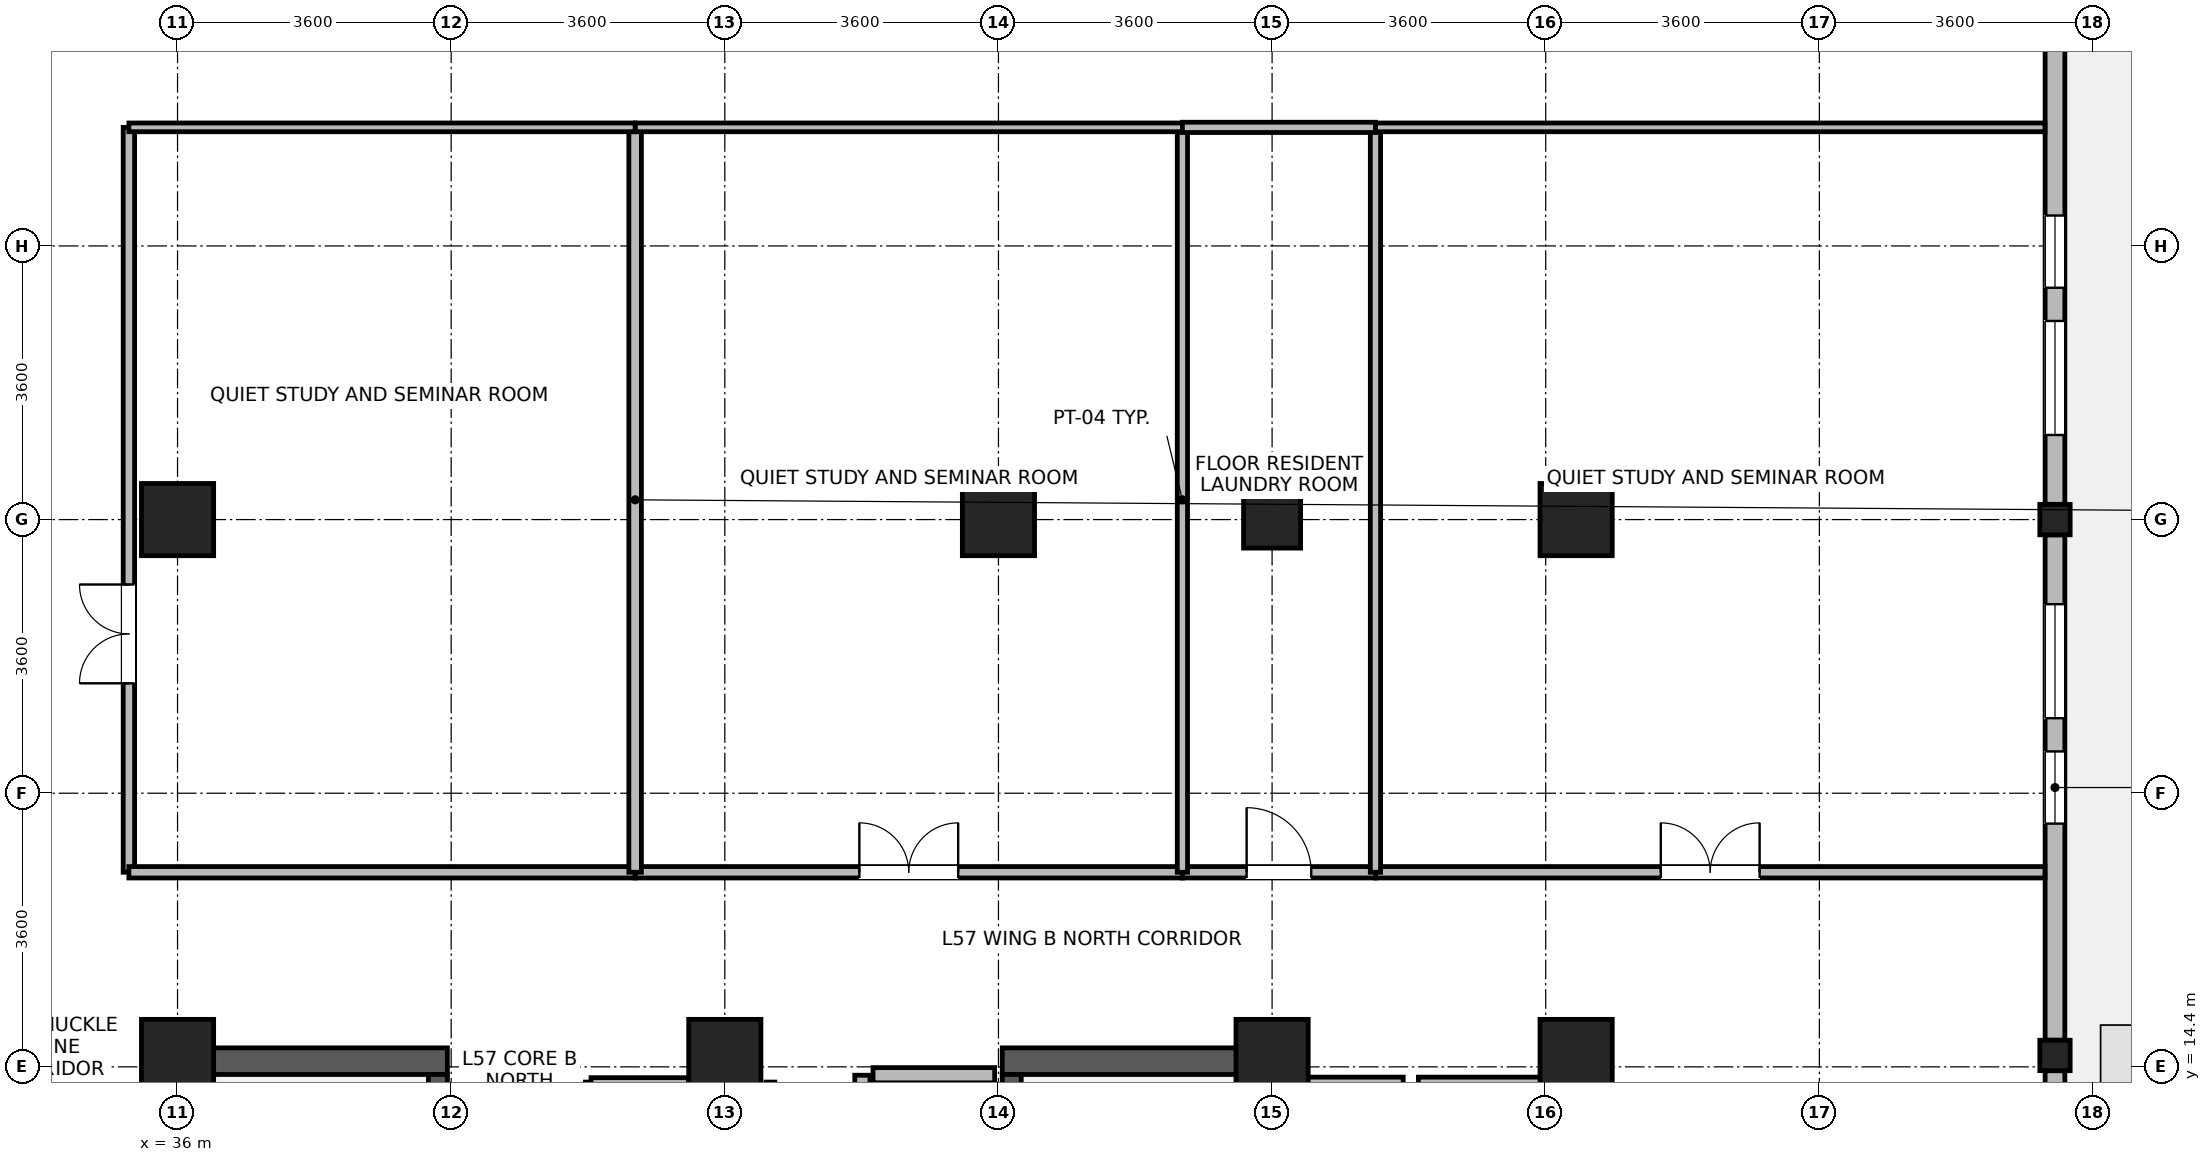
"""IFC4 building model, lengths in metres.
Left out: names, types, materials, properties, quantities, classifications, styles, units other than length and angle.
Written with IfcOpenShell. Run it as: python <this file> out.ifc"""

import sys

from ifc_helpers import new_model, si_unit, direction, frame, frame_2d, origin, origin_2d, place, context, subcontext, project, spatial, rectangle, i_section, extrude, source, transform, mapped, element, fill, save


model = new_model("IFC4")
c1 = context("Model", 3, precision=1e-05, world=origin(), true_north=direction((0.0, 1.0)))
c2 = subcontext(c1, "Body", "Model", "MODEL_VIEW")
j1 = project(units=[si_unit("LENGTHUNIT", "METRE"), si_unit("PLANEANGLEUNIT", "RADIAN")], contexts=[c1])
p1 = place(None, origin())
s1 = spatial("IfcSite", under=j1, at=p1, CompositionType="ELEMENT")
p2 = place(p1, origin())
s2 = spatial("IfcBuilding", under=s1, at=p2, CompositionType="ELEMENT")
p3 = place(p2, frame((0.0, 0.0, 224.0)))
s3 = spatial("IfcBuildingStorey", under=s2, at=p3, CompositionType="ELEMENT", Elevation=224.0)
for number, where, z_axis, x_axis in (
    (1, (36.175, 6.95, 0.0), (0.0, 0.0, 1.0), (0.0, 1.0, 0.0)),
    (2, (50.225, 6.95, 0.0), (0.0, 0.0, 1.0), (0.0, 1.0, 0.0)),
):
    element("IfcWall", number, at=place(p3, frame(where, z_axis=z_axis, x_axis=x_axis)), inside=s3, PredefinedType="SHEAR", context=c2, shape_type="SweptSolid", body=[
        extrude(rectangle(XDim=7.7, YDim=0.35, at=frame_2d((3.85, 0.0))), origin(), (0.0, 0.0, 1.0), 3.47),
    ])
for number, where, z_axis, x_axis in (
    (3, (36.35, 14.475, 0.0), (0.0, 0.0, 1.0), (1.0, 0.0, 0.0)),
    (4, (46.85, 14.475, 0.0), (0.0, 0.0, 1.0), (1.0, 0.0, 0.0)),
):
    element("IfcWall", number, at=place(p3, frame(where, z_axis=z_axis, x_axis=x_axis)), inside=s3, PredefinedType="SHEAR", context=c2, shape_type="SweptSolid", body=[
        extrude(rectangle(XDim=3.2, YDim=0.35, at=frame_2d((1.6, 0.0))), origin(), (0.0, 0.0, 1.0), 3.47),
    ])
p4 = place(p3, frame((39.425, 7.3, 0.0), z_axis=(0.0, 0.0, 1.0), x_axis=(0.0, 1.0, 0.0)))
e5 = element("IfcWall", 5, at=p4, inside=s3, PredefinedType="SHEAR", context=c2, shape_type="SweptSolid", body=[
    extrude(rectangle(XDim=7.0, YDim=0.25, at=frame_2d((3.5, 0.0))), origin(), (0.0, 0.0, 1.0), 3.47),
])
p5 = place(p4, frame((0.15, 0.0, 0.0)))
e6 = element("IfcOpeningElement", 6, at=p5, cuts=e5, PredefinedType="OPENING", context=c2, shape_type="SweptSolid", body=[
    extrude(rectangle(XDim=1.1, YDim=2.08, at=frame_2d((0.55, 1.04))), frame((0.0, 0.135, 0.0), z_axis=(0.0, -1.0, 0.0), x_axis=(1.0, 0.0, 0.0)), (0.0, 0.0, 1.0), 0.27),
])
p6 = place(p3, frame((46.975, 7.3, 0.0), z_axis=(0.0, 0.0, 1.0), x_axis=(0.0, 1.0, 0.0)))
e7 = element("IfcWall", 7, at=p6, inside=s3, PredefinedType="SHEAR", context=c2, shape_type="SweptSolid", body=[
    extrude(rectangle(XDim=7.0, YDim=0.25, at=frame_2d((3.5, 0.0))), origin(), (0.0, 0.0, 1.0), 3.47),
])
p7 = place(p6, frame((0.15, 0.0, 0.0)))
e8 = element("IfcOpeningElement", 8, at=p7, cuts=e7, PredefinedType="OPENING", context=c2, shape_type="SweptSolid", body=[
    extrude(rectangle(XDim=1.1, YDim=2.08, at=frame_2d((0.55, 1.04))), frame((0.0, 0.135, 0.0), z_axis=(0.0, -1.0, 0.0), x_axis=(1.0, 0.0, 0.0)), (0.0, 0.0, 1.0), 0.27),
])
m1 = source(origin(), c2, "Body", "SweptSolid", [
    extrude(rectangle(XDim=0.95, YDim=0.95, at=origin_2d()), origin(), (0.0, 0.0, 1.0), 3.7),
])
for number, where, z_axis, x_axis in (
    (9, (36.0, 21.6, 0.0), (0.0, 0.0, 1.0), (1.0, 0.0, 0.0)),
    (10, (46.8, 21.6, 0.0), (0.0, 0.0, 1.0), (1.0, 0.0, 0.0)),
    (11, (36.0, 14.55, 0.0), (0.0, 0.0, 1.0), (1.0, 0.0, 0.0)),
    (12, (43.2, 14.55, 0.0), (0.0, 0.0, 1.0), (1.0, 0.0, 0.0)),
    (13, (50.4, 14.55, 0.0), (0.0, 0.0, 1.0), (1.0, 0.0, 0.0)),
):
    element("IfcColumn", number, at=place(p3, frame(where, z_axis=z_axis, x_axis=x_axis)), inside=s3, PredefinedType="COLUMN", context=c2, shape_type="MappedRepresentation", body=[
        mapped(m1, transform((0.0, 0.0, 0.0), x_axis=(1.0, 0.0, 0.0), y_axis=(0.0, 1.0, 0.0), z_axis=(0.0, 0.0, 1.0), scale=1.0)),
    ])
m2 = source(origin(), c2, "Body", "SweptSolid", [
    extrude(rectangle(XDim=0.75, YDim=0.75, at=origin_2d()), origin(), (0.0, 0.0, 1.0), 3.7),
])
p8 = place(p3, frame((50.4, 21.6, 0.0), z_axis=(0.0, 0.0, 1.0), x_axis=(1.0, 0.0, 0.0)))
e14 = element("IfcColumn", 14, at=p8, inside=s3, PredefinedType="PILASTER", context=c2, shape_type="MappedRepresentation", body=[
    mapped(m2, transform((0.0, 0.0, 0.0), x_axis=(1.0, 0.0, 0.0), y_axis=(0.0, 1.0, 0.0), z_axis=(0.0, 0.0, 1.0), scale=1.0)),
])
for number, where, z_axis, x_axis in (
    (15, (54.4, 14.55, 0.0), (0.0, 0.0, 1.0), (1.0, 0.0, 0.0)),
    (16, (54.4, 21.6, 0.0), (0.0, 0.0, 1.0), (1.0, 0.0, 0.0)),
):
    element("IfcColumn", number, at=place(p3, frame(where, z_axis=z_axis, x_axis=x_axis)), inside=s3, PredefinedType="COLUMN", context=c2, shape_type="MappedRepresentation", body=[
        mapped(m1, transform((0.0, 0.0, 0.0), x_axis=(1.0, 0.0, 0.0), y_axis=(0.0, 1.0, 0.0), z_axis=(0.0, 0.0, 1.0), scale=1.0)),
    ])
m3 = source(origin(), c2, "Body", "SweptSolid", [
    extrude(i_section(OverallWidth=0.399, OverallDepth=0.4, WebThickness=0.017, FlangeThickness=0.023, FilletRadius=0.015, at=origin_2d()), origin(), (0.0, 0.0, 1.0), 3.7),
])
for number, where, z_axis, x_axis in (
    (17, (60.7, 14.55, 0.0), (0.0, 0.0, 1.0), (1.0, 0.0, 0.0)),
    (18, (60.7, 21.6, 0.0), (0.0, 0.0, 1.0), (1.0, 0.0, 0.0)),
):
    element("IfcColumn", number, at=place(p3, frame(where, z_axis=z_axis, x_axis=x_axis)), inside=s3, PredefinedType="COLUMN", context=c2, shape_type="MappedRepresentation", body=[
        mapped(m3, transform((0.0, 0.0, 0.0), x_axis=(1.0, 0.0, 0.0), y_axis=(0.0, 1.0, 0.0), z_axis=(0.0, 0.0, 1.0), scale=1.0)),
    ])
p9 = place(p3, frame((60.7, 14.349, 0.0), z_axis=(0.0, 0.0, 1.0), x_axis=(0.0, -1.0, 0.0)))
e19 = element("IfcWall", 19, at=p9, inside=s3, PredefinedType="STANDARD", context=c2, shape_type="SweptSolid", body=[
    extrude(rectangle(XDim=5.079, YDim=0.26, at=frame_2d((2.54, 0.0))), origin(), (0.0, 0.0, 1.0), 3.05),
])
p10 = place(p9, frame((1.79, 0.0, 0.0)))
e20 = element("IfcOpeningElement", 20, at=p10, cuts=e19, PredefinedType="OPENING", context=c2, shape_type="SweptSolid", body=[
    extrude(rectangle(XDim=1.5, YDim=2.15, at=frame_2d((0.75, 1.075))), frame((0.0, 0.14, 0.0), z_axis=(0.0, -1.0, 0.0), x_axis=(1.0, 0.0, 0.0)), (0.0, 0.0, 1.0), 0.28),
])
p11 = place(p3, frame((60.7, 21.399, 0.0), z_axis=(0.0, 0.0, 1.0), x_axis=(0.0, -1.0, 0.0)))
e21 = element("IfcWall", 21, at=p11, inside=s3, PredefinedType="STANDARD", context=c2, shape_type="SweptSolid", body=[
    extrude(rectangle(XDim=6.648, YDim=0.26, at=frame_2d((3.324, 0.0))), origin(), (0.0, 0.0, 1.0), 3.05),
])
p12 = place(p11, frame((0.912, 0.0, 0.85)))
e22 = element("IfcOpeningElement", 22, at=p12, cuts=e21, PredefinedType="OPENING", context=c2, shape_type="SweptSolid", body=[
    extrude(rectangle(XDim=1.5, YDim=1.85, at=frame_2d((0.75, 0.925))), frame((0.0, 0.14, 0.0), z_axis=(0.0, -1.0, 0.0), x_axis=(1.0, 0.0, 0.0)), (0.0, 0.0, 1.0), 0.28),
])
p13 = place(p11, frame((2.849, 0.0, 0.85)))
e23 = element("IfcOpeningElement", 23, at=p13, cuts=e21, PredefinedType="OPENING", context=c2, shape_type="SweptSolid", body=[
    extrude(rectangle(XDim=0.95, YDim=1.75, at=frame_2d((0.475, 0.875))), frame((0.0, 0.14, 0.0), z_axis=(0.0, -1.0, 0.0), x_axis=(1.0, 0.0, 0.0)), (0.0, 0.0, 1.0), 0.28),
])
p14 = place(p3, frame((60.7, 28.449, 0.0), z_axis=(0.0, 0.0, 1.0), x_axis=(0.0, -1.0, 0.0)))
e24 = element("IfcWall", 24, at=p14, inside=s3, PredefinedType="STANDARD", context=c2, shape_type="SweptSolid", body=[
    extrude(rectangle(XDim=6.648, YDim=0.26, at=frame_2d((3.324, 0.0))), origin(), (0.0, 0.0, 1.0), 3.05),
])
p15 = place(p14, frame((4.236, 0.0, 0.85)))
e25 = element("IfcOpeningElement", 25, at=p15, cuts=e24, PredefinedType="OPENING", context=c2, shape_type="SweptSolid", body=[
    extrude(rectangle(XDim=1.5, YDim=1.85, at=frame_2d((0.75, 0.925))), frame((0.0, 0.14, 0.0), z_axis=(0.0, -1.0, 0.0), x_axis=(1.0, 0.0, 0.0)), (0.0, 0.0, 1.0), 0.28),
])
p16 = place(p14, frame((2.849, 0.0, 0.85)))
e26 = element("IfcOpeningElement", 26, at=p16, cuts=e24, PredefinedType="OPENING", context=c2, shape_type="SweptSolid", body=[
    extrude(rectangle(XDim=0.95, YDim=1.75, at=frame_2d((0.475, 0.875))), frame((0.0, 0.14, 0.0), z_axis=(0.0, -1.0, 0.0), x_axis=(1.0, 0.0, 0.0)), (0.0, 0.0, 1.0), 0.28),
])
p17 = place(p3, frame((50.475, 14.165, 0.0), z_axis=(0.0, 0.0, 1.0), x_axis=(1.0, 0.0, 0.0)))
e27 = element("IfcWall", 27, at=p17, inside=s3, PredefinedType="PARTITIONING", context=c2, shape_type="SweptSolid", body=[
    extrude(rectangle(XDim=1.65, YDim=0.2, at=frame_2d((0.825, 0.0))), origin(), (0.0, 0.0, 1.0), 3.45),
])
p18 = place(p3, frame((52.325, 14.165, 0.0), z_axis=(0.0, 0.0, 1.0), x_axis=(1.0, 0.0, 0.0)))
e28 = element("IfcWall", 28, at=p18, inside=s3, PredefinedType="PARTITIONING", context=c2, shape_type="SweptSolid", body=[
    extrude(rectangle(XDim=1.65, YDim=0.2, at=frame_2d((0.825, 0.0))), origin(), (0.0, 0.0, 1.0), 3.45),
])
p19 = place(p3, frame((45.15, 14.29, 0.0), z_axis=(0.0, 0.0, 1.0), x_axis=(1.0, 0.0, 0.0)))
e29 = element("IfcWall", 29, at=p19, inside=s3, PredefinedType="PARTITIONING", context=c2, shape_type="SweptSolid", body=[
    extrude(rectangle(XDim=1.6, YDim=0.2, at=frame_2d((0.8, 0.0))), origin(), (0.0, 0.0, 1.0), 2.55),
])
p20 = place(p3, frame((45.01, 11.61, 0.0), z_axis=(0.0, 0.0, 1.0), x_axis=(0.0, 1.0, 0.0)))
e30 = element("IfcWall", 30, at=p20, inside=s3, PredefinedType="PARTITIONING", context=c2, shape_type="SweptSolid", body=[
    extrude(rectangle(XDim=2.68, YDim=0.2, at=frame_2d((1.34, 0.0))), origin(), (0.0, 0.0, 1.0), 3.45),
])
p21 = place(p3, frame((35.36, 16.96, 0.0), z_axis=(0.0, 0.0, 1.0), x_axis=(0.0, 1.0, 0.0)))
e31 = element("IfcWall", 31, at=p21, inside=s3, PredefinedType="PARTITIONING", context=c2, shape_type="SweptSolid", body=[
    extrude(rectangle(XDim=9.8, YDim=0.15, at=frame_2d((4.9, 0.0))), origin(), (0.0, 0.0, 1.0), 3.45),
])
p22 = place(p21, frame((2.486, 0.0, 0.0)))
e32 = element("IfcOpeningElement", 32, at=p22, cuts=e31, PredefinedType="OPENING", context=c2, shape_type="SweptSolid", body=[
    extrude(rectangle(XDim=1.3, YDim=2.12, at=frame_2d((0.65, 1.06))), frame((0.0, 0.085, 0.0), z_axis=(0.0, -1.0, 0.0), x_axis=(1.0, 0.0, 0.0)), (0.0, 0.0, 1.0), 0.17),
])
p23 = place(p3, frame((51.76, 16.96, 0.0), z_axis=(0.0, 0.0, 1.0), x_axis=(1.0, 0.0, 0.0)))
e33 = element("IfcWall", 33, at=p23, inside=s3, PredefinedType="PARTITIONING", context=c2, shape_type="SweptSolid", body=[
    extrude(rectangle(XDim=8.808, YDim=0.15, at=frame_2d((4.404, 0.0))), origin(), (0.0, 0.0, 1.0), 3.45),
])
p24 = place(p23, frame((3.754, 0.0, 0.0)))
e34 = element("IfcOpeningElement", 34, at=p24, cuts=e33, PredefinedType="OPENING", context=c2, shape_type="SweptSolid", body=[
    extrude(rectangle(XDim=1.3, YDim=2.12, at=frame_2d((0.65, 1.06))), frame((0.0, 0.085, 0.0), z_axis=(0.0, -1.0, 0.0), x_axis=(1.0, 0.0, 0.0)), (0.0, 0.0, 1.0), 0.17),
])
p25 = place(p3, frame((42.02, 16.96, 0.0), z_axis=(0.0, 0.0, 1.0), x_axis=(1.0, 0.0, 0.0)))
e35 = element("IfcWall", 35, at=p25, inside=s3, PredefinedType="PARTITIONING", context=c2, shape_type="SweptSolid", body=[
    extrude(rectangle(XDim=7.2, YDim=0.15, at=frame_2d((3.6, 0.0))), origin(), (0.0, 0.0, 1.0), 3.45),
])
p26 = place(p25, frame((2.95, 0.0, 0.0)))
e36 = element("IfcOpeningElement", 36, at=p26, cuts=e35, PredefinedType="OPENING", context=c2, shape_type="SweptSolid", body=[
    extrude(rectangle(XDim=1.3, YDim=2.12, at=frame_2d((0.65, 1.06))), frame((0.0, 0.085, 0.0), z_axis=(0.0, -1.0, 0.0), x_axis=(1.0, 0.0, 0.0)), (0.0, 0.0, 1.0), 0.17),
])
p27 = place(p3, frame((35.36, 16.96, 0.0), z_axis=(0.0, 0.0, 1.0), x_axis=(1.0, 0.0, 0.0)))
e37 = element("IfcWall", 37, at=p27, inside=s3, PredefinedType="PARTITIONING", context=c2, shape_type="SweptSolid", body=[
    extrude(rectangle(XDim=6.66, YDim=0.15, at=frame_2d((3.33, 0.0))), origin(), (0.0, 0.0, 1.0), 3.45),
])
p28 = place(p3, frame((49.22, 16.96, 0.0), z_axis=(0.0, 0.0, 1.0), x_axis=(1.0, 0.0, 0.0)))
e38 = element("IfcWall", 38, at=p28, inside=s3, PredefinedType="PARTITIONING", context=c2, shape_type="SweptSolid", body=[
    extrude(rectangle(XDim=2.54, YDim=0.15, at=frame_2d((1.27, 0.0))), origin(), (0.0, 0.0, 1.0), 3.45),
])
p29 = place(p28, frame((0.845, 0.0, 0.0)))
e39 = element("IfcOpeningElement", 39, at=p29, cuts=e38, PredefinedType="OPENING", context=c2, shape_type="SweptSolid", body=[
    extrude(rectangle(XDim=0.85, YDim=2.04, at=frame_2d((0.425, 1.02))), frame((0.0, 0.085, 0.0), z_axis=(0.0, -1.0, 0.0), x_axis=(1.0, 0.0, 0.0)), (0.0, 0.0, 1.0), 0.17),
])
p30 = place(p3, frame((42.02, 16.96, 0.0), z_axis=(0.0, 0.0, 1.0), x_axis=(0.0, 1.0, 0.0)))
e40 = element("IfcWall", 40, at=p30, inside=s3, PredefinedType="PARTITIONING", context=c2, shape_type="SweptSolid", body=[
    extrude(rectangle(XDim=9.8, YDim=0.165, at=frame_2d((4.9, 0.0))), origin(), (0.0, 0.0, 1.0), 3.45),
])
for number, where, z_axis, x_axis in (
    (41, (49.22, 16.96, 0.0), (0.0, 0.0, 1.0), (0.0, 1.0, 0.0)),
    (42, (51.76, 16.96, 0.0), (0.0, 0.0, 1.0), (0.0, 1.0, 0.0)),
):
    element("IfcWall", number, at=place(p3, frame(where, z_axis=z_axis, x_axis=x_axis)), inside=s3, PredefinedType="PARTITIONING", context=c2, shape_type="SweptSolid", body=[
        extrude(rectangle(XDim=9.8, YDim=0.135, at=frame_2d((4.9, 0.0))), origin(), (0.0, 0.0, 1.0), 3.45),
    ])
p31 = place(p3, frame((51.76, 26.76, 0.0), z_axis=(0.0, 0.0, 1.0), x_axis=(1.0, 0.0, 0.0)))
e43 = element("IfcWall", 43, at=p31, inside=s3, PredefinedType="PARTITIONING", context=c2, shape_type="SweptSolid", body=[
    extrude(rectangle(XDim=8.808, YDim=0.115, at=frame_2d((4.404, 0.0))), origin(), (0.0, 0.0, 1.0), 3.45),
])
p32 = place(p3, frame((42.02, 26.76, 0.0), z_axis=(0.0, 0.0, 1.0), x_axis=(1.0, 0.0, 0.0)))
e44 = element("IfcWall", 44, at=p32, inside=s3, PredefinedType="PARTITIONING", context=c2, shape_type="SweptSolid", body=[
    extrude(rectangle(XDim=7.2, YDim=0.115, at=frame_2d((3.6, 0.0))), origin(), (0.0, 0.0, 1.0), 3.45),
])
p33 = place(p3, frame((35.36, 26.76, 0.0), z_axis=(0.0, 0.0, 1.0), x_axis=(1.0, 0.0, 0.0)))
e45 = element("IfcWall", 45, at=p33, inside=s3, PredefinedType="PARTITIONING", context=c2, shape_type="SweptSolid", body=[
    extrude(rectangle(XDim=6.66, YDim=0.115, at=frame_2d((3.33, 0.0))), origin(), (0.0, 0.0, 1.0), 3.45),
])
p34 = place(p3, frame((49.22, 26.76, 0.0), z_axis=(0.0, 0.0, 1.0), x_axis=(1.0, 0.0, 0.0)))
e46 = element("IfcWall", 46, at=p34, inside=s3, PredefinedType="PARTITIONING", context=c2, shape_type="SweptSolid", body=[
    extrude(rectangle(XDim=2.54, YDim=0.135, at=frame_2d((1.27, 0.0))), origin(), (0.0, 0.0, 1.0), 3.45),
])
p35 = place(p3, frame((41.44, 14.2, 0.0), z_axis=(0.0, 0.0, 1.0), x_axis=(1.0, 0.0, 0.0)))
e47 = element("IfcWall", 47, at=p35, inside=s3, PredefinedType="PARTITIONING", context=c2, shape_type="SweptSolid", body=[
    extrude(rectangle(XDim=1.285, YDim=0.115, at=frame_2d((0.643, 0.0))), origin(), (0.0, 0.0, 1.0), 2.55),
])
p36 = place(p12, origin())
e48 = element("IfcWindow", 48, at=p36, inside=s3, PartitioningType="SINGLE_PANEL", PredefinedType="WINDOW", context=c2, shape_type="SweptSolid", body=[
    extrude(rectangle(XDim=1.5, YDim=1.85, at=frame_2d((0.75, 0.925))), frame((0.0, 0.03, 0.0), z_axis=(0.0, -1.0, 0.0), x_axis=(1.0, 0.0, 0.0)), (0.0, 0.0, 1.0), 0.06),
])
fill(e22, e48)
p37 = place(p13, origin())
e49 = element("IfcWindow", 49, at=p37, inside=s3, PartitioningType="SINGLE_PANEL", PredefinedType="WINDOW", context=c2, shape_type="SweptSolid", body=[
    extrude(rectangle(XDim=0.95, YDim=1.75, at=frame_2d((0.475, 0.875))), frame((0.0, 0.03, 0.0), z_axis=(0.0, -1.0, 0.0), x_axis=(1.0, 0.0, 0.0)), (0.0, 0.0, 1.0), 0.06),
])
fill(e23, e49)
p38 = place(p15, origin())
e50 = element("IfcWindow", 50, at=p38, inside=s3, PartitioningType="SINGLE_PANEL", PredefinedType="WINDOW", context=c2, shape_type="SweptSolid", body=[
    extrude(rectangle(XDim=1.5, YDim=1.85, at=frame_2d((0.75, 0.925))), frame((0.0, 0.03, 0.0), z_axis=(0.0, -1.0, 0.0), x_axis=(1.0, 0.0, 0.0)), (0.0, 0.0, 1.0), 0.06),
])
fill(e25, e50)
p39 = place(p16, origin())
e51 = element("IfcWindow", 51, at=p39, inside=s3, PartitioningType="SINGLE_PANEL", PredefinedType="WINDOW", context=c2, shape_type="SweptSolid", body=[
    extrude(rectangle(XDim=0.95, YDim=1.75, at=frame_2d((0.475, 0.875))), frame((0.0, 0.03, 0.0), z_axis=(0.0, -1.0, 0.0), x_axis=(1.0, 0.0, 0.0)), (0.0, 0.0, 1.0), 0.06),
])
fill(e26, e51)
p40 = place(p22, origin())
e52 = element("IfcDoor", 52, at=p40, inside=s3, OperationType="DOUBLE_DOOR_SINGLE_SWING", PredefinedType="DOOR", context=c2, shape_type="SweptSolid", body=[
    extrude(rectangle(XDim=1.3, YDim=2.12, at=frame_2d((0.65, 1.06))), frame((0.0, 0.025, 0.0), z_axis=(0.0, -1.0, 0.0), x_axis=(1.0, 0.0, 0.0)), (0.0, 0.0, 1.0), 0.05),
])
fill(e32, e52)
p41 = place(p24, origin())
e53 = element("IfcDoor", 53, at=p41, inside=s3, OperationType="DOUBLE_DOOR_SINGLE_SWING", PredefinedType="DOOR", context=c2, shape_type="SweptSolid", body=[
    extrude(rectangle(XDim=1.3, YDim=2.12, at=frame_2d((0.65, 1.06))), frame((0.0, 0.025, 0.0), z_axis=(0.0, -1.0, 0.0), x_axis=(1.0, 0.0, 0.0)), (0.0, 0.0, 1.0), 0.05),
])
fill(e34, e53)
p42 = place(p26, origin())
e54 = element("IfcDoor", 54, at=p42, inside=s3, OperationType="DOUBLE_DOOR_SINGLE_SWING", PredefinedType="DOOR", context=c2, shape_type="SweptSolid", body=[
    extrude(rectangle(XDim=1.3, YDim=2.12, at=frame_2d((0.65, 1.06))), frame((0.0, 0.025, 0.0), z_axis=(0.0, -1.0, 0.0), x_axis=(1.0, 0.0, 0.0)), (0.0, 0.0, 1.0), 0.05),
])
fill(e36, e54)
p43 = place(p29, origin())
e55 = element("IfcDoor", 55, at=p43, inside=s3, OperationType="SINGLE_SWING_LEFT", PredefinedType="DOOR", context=c2, shape_type="SweptSolid", body=[
    extrude(rectangle(XDim=0.85, YDim=2.04, at=frame_2d((0.425, 1.02))), frame((0.0, 0.025, 0.0), z_axis=(0.0, -1.0, 0.0), x_axis=(1.0, 0.0, 0.0)), (0.0, 0.0, 1.0), 0.05),
])
fill(e39, e55)
save(model, sys.argv[1])
